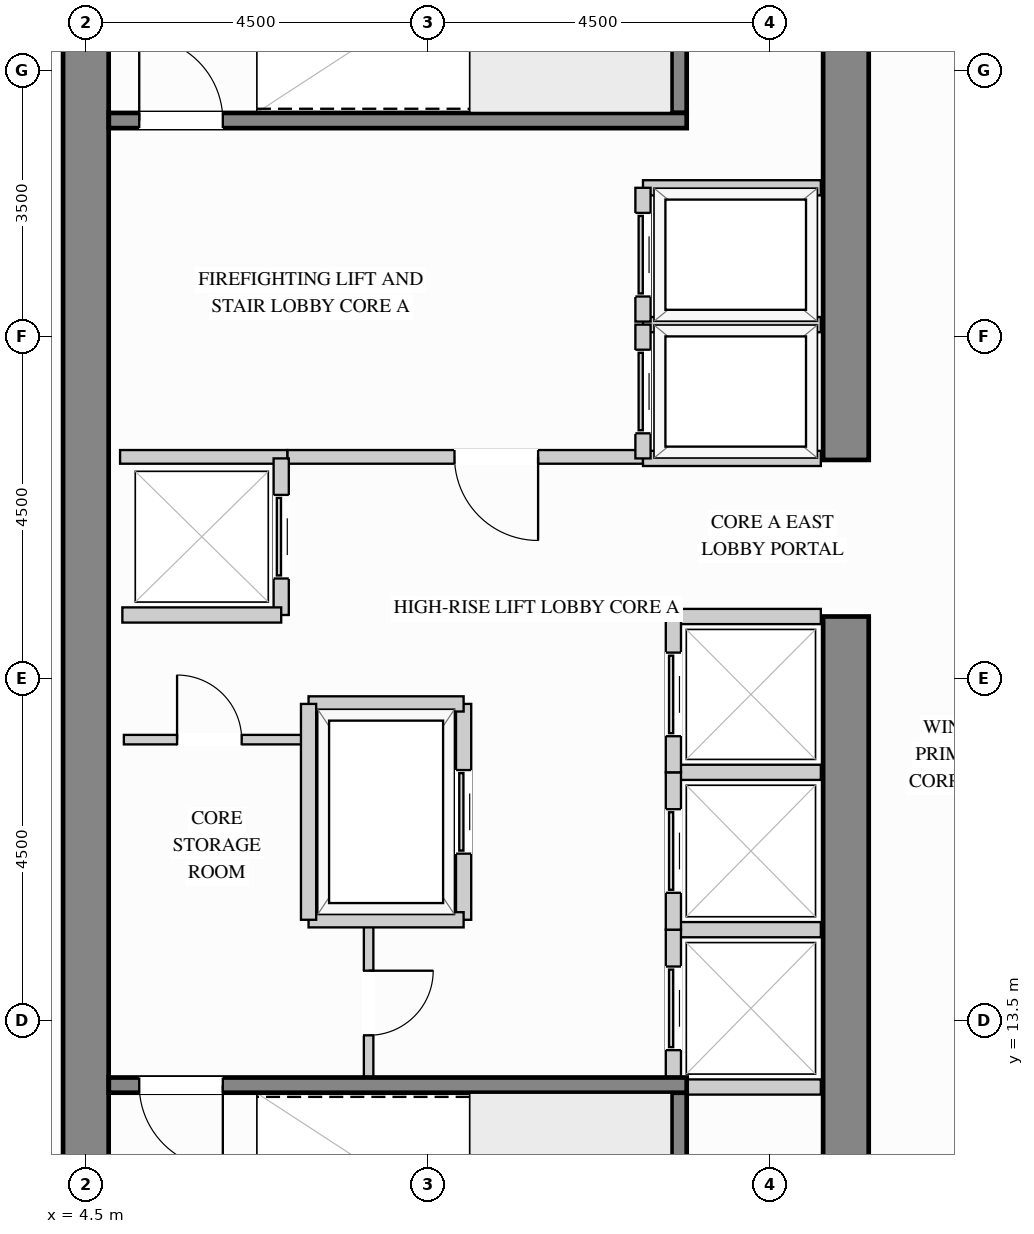
"""IFC4 building model, lengths in metres.
Left out: names, types, materials, properties, quantities, classifications, styles, units other than length and angle.
Written with IfcOpenShell. Run it as: python <this file> out.ifc"""

import sys

from ifc_helpers import new_model, si_unit, direction, frame, frame_2d, origin, place, context, subcontext, project, spatial, rectangle, extrude, source, transform, mapped, element, fill, save


model = new_model("IFC4")
c1 = context("Model", 3, precision=1e-05, world=origin(), true_north=direction((0.0, 1.0)))
c2 = subcontext(c1, "Body", "Model", "MODEL_VIEW")
j1 = project(units=[si_unit("LENGTHUNIT", "METRE"), si_unit("PLANEANGLEUNIT", "RADIAN")], contexts=[c1])
p1 = place(None, origin())
s1 = spatial("IfcSite", under=j1, at=p1, CompositionType="ELEMENT")
p2 = place(p1, origin())
s2 = spatial("IfcBuilding", under=s1, at=p2, CompositionType="ELEMENT")
p3 = place(p2, frame((0.0, 0.0, 193.5)))
s3 = spatial("IfcBuildingStorey", under=s2, at=p3, CompositionType="ELEMENT", Elevation=193.5)
m1 = source(origin(), c2, "Body", "SweptSolid", [
    extrude(rectangle(XDim=10.02, YDim=0.6, at=frame_2d((5.01, 0.0))), origin(), (0.0, 0.0, 1.0), 3.4),
])
p4 = place(p3, frame((14.5, 8.8, 0.0), z_axis=(0.0, 0.0, 1.0), x_axis=(0.0, 1.0, 0.0)))
e1 = element("IfcWall", 1, at=p4, inside=s3, PredefinedType="SHEAR", context=c2, shape_type="MappedRepresentation", body=[
    mapped(m1, transform((0.0, 0.0, 0.0), x_axis=(1.0, 0.0, 0.0), y_axis=(0.0, 1.0, 0.0), z_axis=(0.0, 0.0, 1.0))),
])
m2 = source(origin(), c2, "Body", "SweptSolid", [
    extrude(rectangle(XDim=8.32, YDim=0.6, at=frame_2d((4.16, 0.0))), origin(), (0.0, 0.0, 1.0), 3.4),
])
p5 = place(p3, frame((14.5, 20.88, 0.0), z_axis=(0.0, 0.0, 1.0), x_axis=(0.0, 1.0, 0.0)))
e2 = element("IfcWall", 2, at=p5, inside=s3, PredefinedType="SHEAR", context=c2, shape_type="MappedRepresentation", body=[
    mapped(m2, transform((0.0, 0.0, 0.0), x_axis=(1.0, 0.0, 0.0), y_axis=(0.0, 1.0, 0.0), z_axis=(0.0, 0.0, 1.0))),
])
m3 = source(origin(), c2, "Body", "SweptSolid", [
    extrude(rectangle(XDim=20.4, YDim=0.6, at=frame_2d((10.2, 0.0))), origin(), (0.0, 0.0, 1.0), 3.4),
])
p6 = place(p3, frame((4.5, 8.8, 0.0), z_axis=(0.0, 0.0, 1.0), x_axis=(0.0, 1.0, 0.0)))
e3 = element("IfcWall", 3, at=p6, inside=s3, PredefinedType="SHEAR", context=c2, shape_type="MappedRepresentation", body=[
    mapped(m3, transform((0.0, 0.0, 0.0), x_axis=(1.0, 0.0, 0.0), y_axis=(0.0, 1.0, 0.0), z_axis=(0.0, 0.0, 1.0))),
])
p7 = place(p3, frame((7.15, 20.92, 0.0), z_axis=(0.0, 0.0, 1.0), x_axis=(1.0, 0.0, 0.0)))
e4 = element("IfcWall", 4, at=p7, inside=s3, PredefinedType="PARTITIONING", context=c2, shape_type="SweptSolid", body=[
    extrude(rectangle(XDim=4.68, YDim=0.18, at=frame_2d((2.34, 0.0))), origin(), (0.0, 0.0, 1.0), 3.385),
])
p8 = place(p7, frame((2.2, 0.0, 0.0)))
e5 = element("IfcOpeningElement", 5, at=p8, cuts=e4, PredefinedType="OPENING", context=c2, shape_type="SweptSolid", body=[
    extrude(rectangle(XDim=1.1, YDim=2.15, at=frame_2d((0.55, 1.075))), frame((0.0, 0.1, 0.0), z_axis=(0.0, -1.0, 0.0), x_axis=(1.0, 0.0, 0.0)), (0.0, 0.0, 1.0), 0.2),
])
m4 = source(origin(), c2, "Body", "SweptSolid", [
    extrude(rectangle(XDim=2.2, YDim=0.18, at=frame_2d((1.1, 0.0))), origin(), (0.0, 0.0, 1.0), 3.385),
])
p9 = place(p3, frame((4.95, 20.92, 0.0), z_axis=(0.0, 0.0, 1.0), x_axis=(1.0, 0.0, 0.0)))
e6 = element("IfcWall", 6, at=p9, inside=s3, PredefinedType="PARTITIONING", context=c2, shape_type="MappedRepresentation", body=[
    mapped(m4, transform((0.0, 0.0, 0.0), x_axis=(1.0, 0.0, 0.0), y_axis=(0.0, 1.0, 0.0), z_axis=(0.0, 0.0, 1.0))),
])
p10 = place(p3, frame((8.22, 12.75, 0.0), z_axis=(0.0, 0.0, 1.0), x_axis=(0.0, 1.0, 0.0)))
e7 = element("IfcWall", 7, at=p10, inside=s3, PredefinedType="PARTITIONING", context=c2, shape_type="SweptSolid", body=[
    extrude(rectangle(XDim=2.07, YDim=0.125, at=frame_2d((1.035, 0.0))), origin(), (0.0, 0.0, 1.0), 3.385),
])
p11 = place(p10, frame((0.56, 0.0, 0.0)))
e8 = element("IfcOpeningElement", 8, at=p11, cuts=e7, PredefinedType="OPENING", context=c2, shape_type="SweptSolid", body=[
    extrude(rectangle(XDim=0.85, YDim=2.1, at=frame_2d((0.425, 1.05))), frame((0.0, 0.073, 0.0), z_axis=(0.0, -1.0, 0.0), x_axis=(1.0, 0.0, 0.0)), (0.0, 0.0, 1.0), 0.145),
])
p12 = place(p3, frame((5.0, 17.2, 0.0), z_axis=(0.0, 0.0, 1.0), x_axis=(1.0, 0.0, 0.0)))
e9 = element("IfcWall", 9, at=p12, inside=s3, PredefinedType="PARTITIONING", context=c2, shape_type="SweptSolid", body=[
    extrude(rectangle(XDim=2.4, YDim=0.125, at=frame_2d((1.2, 0.0))), origin(), (0.0, 0.0, 1.0), 3.385),
])
p13 = place(p12, frame((0.7, 0.0, 0.0)))
e10 = element("IfcOpeningElement", 10, at=p13, cuts=e9, PredefinedType="OPENING", context=c2, shape_type="SweptSolid", body=[
    extrude(rectangle(XDim=0.85, YDim=2.1, at=frame_2d((0.425, 1.05))), frame((0.0, 0.073, 0.0), z_axis=(0.0, -1.0, 0.0), x_axis=(1.0, 0.0, 0.0)), (0.0, 0.0, 1.0), 0.145),
])
m5 = source(origin(), c2, "Body", "SweptSolid", [
    extrude(rectangle(XDim=2.34, YDim=0.2, at=frame_2d((1.17, 0.0))), origin(), (0.0, 0.0, 1.0), 3.385),
])
for number, where, z_axis, x_axis in (
    (11, (11.83, 22.66, 0.0), (0.0, 0.0, 1.0), (1.0, 0.0, 0.0)),
    (12, (11.83, 20.9, 0.0), (0.0, 0.0, 1.0), (1.0, 0.0, 0.0)),
):
    element("IfcWall", number, at=place(p3, frame(where, z_axis=z_axis, x_axis=x_axis)), inside=s3, PredefinedType="PARTITIONING", context=c2, shape_type="MappedRepresentation", body=[
        mapped(m5, transform((0.0, 0.0, 0.0), x_axis=(1.0, 0.0, 0.0), y_axis=(0.0, 1.0, 0.0), z_axis=(0.0, 0.0, 1.0))),
    ])
p14 = place(p3, frame((11.83, 20.9, 0.0), z_axis=(0.0, 0.0, 1.0), x_axis=(0.0, 1.0, 0.0)))
e13 = element("IfcWall", 13, at=p14, inside=s3, PredefinedType="PARTITIONING", context=c2, shape_type="SweptSolid", body=[
    extrude(rectangle(XDim=1.76, YDim=0.2, at=frame_2d((0.88, 0.0))), origin(), (0.0, 0.0, 1.0), 3.385),
])
p15 = place(p14, frame((0.33, 0.0, 0.0)))
e14 = element("IfcOpeningElement", 14, at=p15, cuts=e13, PredefinedType="OPENING", context=c2, shape_type="SweptSolid", body=[
    extrude(rectangle(XDim=1.1, YDim=2.2, at=frame_2d((0.55, 1.1))), frame((0.0, 0.11, 0.0), z_axis=(0.0, -1.0, 0.0), x_axis=(1.0, 0.0, 0.0)), (0.0, 0.0, 1.0), 0.22),
])
p16 = place(p3, frame((11.83, 24.46, 0.0), z_axis=(0.0, 0.0, 1.0), x_axis=(1.0, 0.0, 0.0)))
e15 = element("IfcWall", 15, at=p16, inside=s3, PredefinedType="PARTITIONING", context=c2, shape_type="MappedRepresentation", body=[
    mapped(m5, transform((0.0, 0.0, 0.0), x_axis=(1.0, 0.0, 0.0), y_axis=(0.0, 1.0, 0.0), z_axis=(0.0, 0.0, 1.0))),
])
p17 = place(p3, frame((11.83, 22.7, 0.0), z_axis=(0.0, 0.0, 1.0), x_axis=(0.0, 1.0, 0.0)))
e16 = element("IfcWall", 16, at=p17, inside=s3, PredefinedType="PARTITIONING", context=c2, shape_type="SweptSolid", body=[
    extrude(rectangle(XDim=1.76, YDim=0.2, at=frame_2d((0.88, 0.0))), origin(), (0.0, 0.0, 1.0), 3.385),
])
p18 = place(p17, frame((0.33, 0.0, 0.0)))
e17 = element("IfcOpeningElement", 17, at=p18, cuts=e16, PredefinedType="OPENING", context=c2, shape_type="SweptSolid", body=[
    extrude(rectangle(XDim=1.1, YDim=2.2, at=frame_2d((0.55, 1.1))), frame((0.0, 0.11, 0.0), z_axis=(0.0, -1.0, 0.0), x_axis=(1.0, 0.0, 0.0)), (0.0, 0.0, 1.0), 0.22),
])
m6 = source(origin(), c2, "Body", "SweptSolid", [
    extrude(rectangle(XDim=1.94, YDim=0.2, at=frame_2d((0.97, 0.0))), origin(), (0.0, 0.0, 1.0), 3.385),
])
for number, where, z_axis, x_axis in (
    (18, (12.23, 14.7, 0.0), (0.0, 0.0, 1.0), (1.0, 0.0, 0.0)),
    (19, (12.23, 12.63, 0.0), (0.0, 0.0, 1.0), (1.0, 0.0, 0.0)),
):
    element("IfcWall", number, at=place(p3, frame(where, z_axis=z_axis, x_axis=x_axis)), inside=s3, PredefinedType="PARTITIONING", context=c2, shape_type="MappedRepresentation", body=[
        mapped(m6, transform((0.0, 0.0, 0.0), x_axis=(1.0, 0.0, 0.0), y_axis=(0.0, 1.0, 0.0), z_axis=(0.0, 0.0, 1.0))),
    ])
p19 = place(p3, frame((12.23, 12.63, 0.0), z_axis=(0.0, 0.0, 1.0), x_axis=(0.0, 1.0, 0.0)))
e20 = element("IfcWall", 20, at=p19, inside=s3, PredefinedType="PARTITIONING", context=c2, shape_type="SweptSolid", body=[
    extrude(rectangle(XDim=2.07, YDim=0.2, at=frame_2d((1.035, 0.0))), origin(), (0.0, 0.0, 1.0), 3.385),
])
p20 = place(p19, frame((0.485, 0.0, 0.0)))
e21 = element("IfcOpeningElement", 21, at=p20, cuts=e20, PredefinedType="OPENING", context=c2, shape_type="SweptSolid", body=[
    extrude(rectangle(XDim=1.1, YDim=2.2, at=frame_2d((0.55, 1.1))), frame((0.0, 0.11, 0.0), z_axis=(0.0, -1.0, 0.0), x_axis=(1.0, 0.0, 0.0)), (0.0, 0.0, 1.0), 0.22),
])
p21 = place(p3, frame((12.23, 16.77, 0.0), z_axis=(0.0, 0.0, 1.0), x_axis=(1.0, 0.0, 0.0)))
e22 = element("IfcWall", 22, at=p21, inside=s3, PredefinedType="PARTITIONING", context=c2, shape_type="MappedRepresentation", body=[
    mapped(m6, transform((0.0, 0.0, 0.0), x_axis=(1.0, 0.0, 0.0), y_axis=(0.0, 1.0, 0.0), z_axis=(0.0, 0.0, 1.0))),
])
p22 = place(p3, frame((12.23, 14.7, 0.0), z_axis=(0.0, 0.0, 1.0), x_axis=(0.0, 1.0, 0.0)))
e23 = element("IfcWall", 23, at=p22, inside=s3, PredefinedType="PARTITIONING", context=c2, shape_type="SweptSolid", body=[
    extrude(rectangle(XDim=2.07, YDim=0.2, at=frame_2d((1.035, 0.0))), origin(), (0.0, 0.0, 1.0), 3.385),
])
p23 = place(p22, frame((0.485, 0.0, 0.0)))
e24 = element("IfcOpeningElement", 24, at=p23, cuts=e23, PredefinedType="OPENING", context=c2, shape_type="SweptSolid", body=[
    extrude(rectangle(XDim=1.1, YDim=2.2, at=frame_2d((0.55, 1.1))), frame((0.0, 0.11, 0.0), z_axis=(0.0, -1.0, 0.0), x_axis=(1.0, 0.0, 0.0)), (0.0, 0.0, 1.0), 0.22),
])
p24 = place(p3, frame((12.23, 18.82, 0.0), z_axis=(0.0, 0.0, 1.0), x_axis=(1.0, 0.0, 0.0)))
e25 = element("IfcWall", 25, at=p24, inside=s3, PredefinedType="PARTITIONING", context=c2, shape_type="MappedRepresentation", body=[
    mapped(m6, transform((0.0, 0.0, 0.0), x_axis=(1.0, 0.0, 0.0), y_axis=(0.0, 1.0, 0.0), z_axis=(0.0, 0.0, 1.0))),
])
p25 = place(p3, frame((12.23, 16.77, 0.0), z_axis=(0.0, 0.0, 1.0), x_axis=(0.0, 1.0, 0.0)))
e26 = element("IfcWall", 26, at=p25, inside=s3, PredefinedType="PARTITIONING", context=c2, shape_type="SweptSolid", body=[
    extrude(rectangle(XDim=2.05, YDim=0.2, at=frame_2d((1.025, 0.0))), origin(), (0.0, 0.0, 1.0), 3.385),
])
p26 = place(p25, frame((0.475, 0.0, 0.0)))
e27 = element("IfcOpeningElement", 27, at=p26, cuts=e26, PredefinedType="OPENING", context=c2, shape_type="SweptSolid", body=[
    extrude(rectangle(XDim=1.1, YDim=2.2, at=frame_2d((0.55, 1.1))), frame((0.0, 0.11, 0.0), z_axis=(0.0, -1.0, 0.0), x_axis=(1.0, 0.0, 0.0)), (0.0, 0.0, 1.0), 0.22),
])
p27 = place(p3, frame((7.07, 18.84, 0.0), z_axis=(0.0, 0.0, 1.0), x_axis=(0.0, 1.0, 0.0)))
e28 = element("IfcWall", 28, at=p27, inside=s3, PredefinedType="PARTITIONING", context=c2, shape_type="SweptSolid", body=[
    extrude(rectangle(XDim=2.06, YDim=0.2, at=frame_2d((1.03, 0.0))), origin(), (0.0, 0.0, 1.0), 3.385),
])
p28 = place(p27, frame((0.48, 0.0, 0.0)))
e29 = element("IfcOpeningElement", 29, at=p28, cuts=e28, PredefinedType="OPENING", context=c2, shape_type="SweptSolid", body=[
    extrude(rectangle(XDim=1.1, YDim=2.2, at=frame_2d((0.55, 1.1))), frame((0.0, 0.11, 0.0), z_axis=(0.0, -1.0, 0.0), x_axis=(1.0, 0.0, 0.0)), (0.0, 0.0, 1.0), 0.22),
])
m7 = source(origin(), c2, "Body", "SweptSolid", [
    extrude(rectangle(XDim=2.09, YDim=0.2, at=frame_2d((1.045, 0.0))), origin(), (0.0, 0.0, 1.0), 3.385),
])
p29 = place(p3, frame((4.98, 18.84, 0.0), z_axis=(0.0, 0.0, 1.0), x_axis=(1.0, 0.0, 0.0)))
e30 = element("IfcWall", 30, at=p29, inside=s3, PredefinedType="PARTITIONING", context=c2, shape_type="MappedRepresentation", body=[
    mapped(m7, transform((0.0, 0.0, 0.0), x_axis=(1.0, 0.0, 0.0), y_axis=(0.0, 1.0, 0.0), z_axis=(0.0, 0.0, 1.0))),
])
p30 = place(p3, frame((9.47, 14.83, 0.0), z_axis=(0.0, 0.0, 1.0), x_axis=(0.0, 1.0, 0.0)))
e31 = element("IfcWall", 31, at=p30, inside=s3, PredefinedType="PARTITIONING", context=c2, shape_type="SweptSolid", body=[
    extrude(rectangle(XDim=2.84, YDim=0.2, at=frame_2d((1.42, 0.0))), origin(), (0.0, 0.0, 1.0), 3.385),
])
p31 = place(p30, frame((0.87, 0.0, 0.0)))
e32 = element("IfcOpeningElement", 32, at=p31, cuts=e31, PredefinedType="OPENING", context=c2, shape_type="SweptSolid", body=[
    extrude(rectangle(XDim=1.1, YDim=2.2, at=frame_2d((0.55, 1.1))), frame((0.0, 0.11, 0.0), z_axis=(0.0, -1.0, 0.0), x_axis=(1.0, 0.0, 0.0)), (0.0, 0.0, 1.0), 0.22),
])
m8 = source(origin(), c2, "Body", "SweptSolid", [
    extrude(rectangle(XDim=2.04, YDim=0.2, at=frame_2d((1.02, 0.0))), origin(), (0.0, 0.0, 1.0), 3.385),
])
for number, where, z_axis, x_axis in (
    (33, (7.43, 17.67, 0.0), (0.0, 0.0, 1.0), (1.0, 0.0, 0.0)),
    (34, (7.43, 14.83, 0.0), (0.0, 0.0, 1.0), (1.0, 0.0, 0.0)),
):
    element("IfcWall", number, at=place(p3, frame(where, z_axis=z_axis, x_axis=x_axis)), inside=s3, PredefinedType="PARTITIONING", context=c2, shape_type="MappedRepresentation", body=[
        mapped(m8, transform((0.0, 0.0, 0.0), x_axis=(1.0, 0.0, 0.0), y_axis=(0.0, 1.0, 0.0), z_axis=(0.0, 0.0, 1.0))),
    ])
m9 = source(origin(), c2, "Body", "SweptSolid", [
    extrude(rectangle(XDim=2.84, YDim=0.2, at=frame_2d((1.42, 0.0))), origin(), (0.0, 0.0, 1.0), 3.385),
])
p32 = place(p3, frame((7.43, 14.83, 0.0), z_axis=(0.0, 0.0, 1.0), x_axis=(0.0, 1.0, 0.0)))
e35 = element("IfcWall", 35, at=p32, inside=s3, PredefinedType="PARTITIONING", context=c2, shape_type="MappedRepresentation", body=[
    mapped(m9, transform((0.0, 0.0, 0.0), x_axis=(1.0, 0.0, 0.0), y_axis=(0.0, 1.0, 0.0), z_axis=(0.0, 0.0, 1.0))),
])
m10 = source(origin(), c2, "Body", "SweptSolid", [
    extrude(rectangle(XDim=3.753, YDim=0.2, at=frame_2d((1.876, 0.0))), origin(), (0.0, 0.0, 1.0), 3.4),
])
p33 = place(p3, frame((12.305, 8.802, 0.0), z_axis=(0.0, 0.0, 1.0), x_axis=(0.0, 1.0, 0.0)))
e36 = element("IfcWall", 36, at=p33, inside=s3, PredefinedType="SHEAR", context=c2, shape_type="MappedRepresentation", body=[
    mapped(m10, transform((0.0, 0.0, 0.0), x_axis=(1.0, 0.0, 0.0), y_axis=(0.0, 1.0, 0.0), z_axis=(0.0, 0.0, 1.0))),
])
p34 = place(p3, frame((4.802, 12.655, 0.0), z_axis=(0.0, 0.0, 1.0), x_axis=(1.0, 0.0, 0.0)))
e37 = element("IfcWall", 37, at=p34, inside=s3, PredefinedType="SHEAR", context=c2, shape_type="SweptSolid", body=[
    extrude(rectangle(XDim=7.603, YDim=0.2, at=frame_2d((3.802, 0.0))), origin(), (0.0, 0.0, 1.0), 3.4),
])
p35 = place(p34, frame((0.4, 0.0, 0.0)))
e38 = element("IfcOpeningElement", 38, at=p35, cuts=e37, PredefinedType="OPENING", context=c2, shape_type="SweptSolid", body=[
    extrude(rectangle(XDim=1.1, YDim=2.15, at=frame_2d((0.55, 1.075))), frame((0.0, 0.11, 0.0), z_axis=(0.0, -1.0, 0.0), x_axis=(1.0, 0.0, 0.0)), (0.0, 0.0, 1.0), 0.22),
])
p36 = place(p3, frame((12.305, 25.445, 0.0), z_axis=(0.0, 0.0, 1.0), x_axis=(0.0, 1.0, 0.0)))
e39 = element("IfcWall", 39, at=p36, inside=s3, PredefinedType="SHEAR", context=c2, shape_type="MappedRepresentation", body=[
    mapped(m10, transform((0.0, 0.0, 0.0), x_axis=(1.0, 0.0, 0.0), y_axis=(0.0, 1.0, 0.0), z_axis=(0.0, 0.0, 1.0))),
])
p37 = place(p3, frame((4.802, 25.345, 0.0), z_axis=(0.0, 0.0, 1.0), x_axis=(1.0, 0.0, 0.0)))
e40 = element("IfcWall", 40, at=p37, inside=s3, PredefinedType="SHEAR", context=c2, shape_type="SweptSolid", body=[
    extrude(rectangle(XDim=7.603, YDim=0.2, at=frame_2d((3.802, 0.0))), origin(), (0.0, 0.0, 1.0), 3.4),
])
p38 = place(p37, frame((0.4, 0.0, 0.0)))
e41 = element("IfcOpeningElement", 41, at=p38, cuts=e40, PredefinedType="OPENING", context=c2, shape_type="SweptSolid", body=[
    extrude(rectangle(XDim=1.1, YDim=2.15, at=frame_2d((0.55, 1.075))), frame((0.0, 0.11, 0.0), z_axis=(0.0, -1.0, 0.0), x_axis=(1.0, 0.0, 0.0)), (0.0, 0.0, 1.0), 0.22),
])
m11 = source(origin(), c2, "Body", "SweptSolid", [
    extrude(rectangle(XDim=1.1, YDim=2.15, at=frame_2d((0.55, 1.075))), frame((0.0, 0.025, 0.0), z_axis=(0.0, -1.0, 0.0), x_axis=(1.0, 0.0, 0.0)), (0.0, 0.0, 1.0), 0.05),
])
p39 = place(p8, origin())
e42 = element("IfcDoor", 42, at=p39, inside=s3, OperationType="SINGLE_SWING_RIGHT", PredefinedType="DOOR", context=c2, shape_type="MappedRepresentation", body=[
    mapped(m11, transform((0.0, 0.0, 0.0), x_axis=(1.0, 0.0, 0.0), y_axis=(0.0, 1.0, 0.0), z_axis=(0.0, 0.0, 1.0))),
])
fill(e5, e42)
m12 = source(origin(), c2, "Body", "SweptSolid", [
    extrude(rectangle(XDim=1.1, YDim=2.2, at=frame_2d((0.55, 1.1))), frame((0.0, 0.025, 0.0), z_axis=(0.0, -1.0, 0.0), x_axis=(1.0, 0.0, 0.0)), (0.0, 0.0, 1.0), 0.05),
])
p40 = place(p15, origin())
e43 = element("IfcDoor", 43, at=p40, inside=s3, OperationType="SLIDING_TO_LEFT", PredefinedType="DOOR", context=c2, shape_type="MappedRepresentation", body=[
    mapped(m12, transform((0.0, 0.0, 0.0), x_axis=(1.0, 0.0, 0.0), y_axis=(0.0, 1.0, 0.0), z_axis=(0.0, 0.0, 1.0))),
])
fill(e14, e43)
p41 = place(p18, origin())
e44 = element("IfcDoor", 44, at=p41, inside=s3, OperationType="SLIDING_TO_LEFT", PredefinedType="DOOR", context=c2, shape_type="MappedRepresentation", body=[
    mapped(m12, transform((0.0, 0.0, 0.0), x_axis=(1.0, 0.0, 0.0), y_axis=(0.0, 1.0, 0.0), z_axis=(0.0, 0.0, 1.0))),
])
fill(e17, e44)
p42 = place(p20, origin())
e45 = element("IfcDoor", 45, at=p42, inside=s3, OperationType="SLIDING_TO_LEFT", PredefinedType="DOOR", context=c2, shape_type="MappedRepresentation", body=[
    mapped(m12, transform((0.0, 0.0, 0.0), x_axis=(1.0, 0.0, 0.0), y_axis=(0.0, 1.0, 0.0), z_axis=(0.0, 0.0, 1.0))),
])
fill(e21, e45)
p43 = place(p23, origin())
e46 = element("IfcDoor", 46, at=p43, inside=s3, OperationType="SLIDING_TO_LEFT", PredefinedType="DOOR", context=c2, shape_type="MappedRepresentation", body=[
    mapped(m12, transform((0.0, 0.0, 0.0), x_axis=(1.0, 0.0, 0.0), y_axis=(0.0, 1.0, 0.0), z_axis=(0.0, 0.0, 1.0))),
])
fill(e24, e46)
p44 = place(p26, origin())
e47 = element("IfcDoor", 47, at=p44, inside=s3, OperationType="SLIDING_TO_LEFT", PredefinedType="DOOR", context=c2, shape_type="MappedRepresentation", body=[
    mapped(m12, transform((0.0, 0.0, 0.0), x_axis=(1.0, 0.0, 0.0), y_axis=(0.0, 1.0, 0.0), z_axis=(0.0, 0.0, 1.0))),
])
fill(e27, e47)
p45 = place(p28, origin())
e48 = element("IfcDoor", 48, at=p45, inside=s3, OperationType="SLIDING_TO_LEFT", PredefinedType="DOOR", context=c2, shape_type="MappedRepresentation", body=[
    mapped(m12, transform((0.0, 0.0, 0.0), x_axis=(1.0, 0.0, 0.0), y_axis=(0.0, 1.0, 0.0), z_axis=(0.0, 0.0, 1.0))),
])
fill(e29, e48)
p46 = place(p31, origin())
e49 = element("IfcDoor", 49, at=p46, inside=s3, OperationType="SLIDING_TO_LEFT", PredefinedType="DOOR", context=c2, shape_type="MappedRepresentation", body=[
    mapped(m12, transform((0.0, 0.0, 0.0), x_axis=(1.0, 0.0, 0.0), y_axis=(0.0, 1.0, 0.0), z_axis=(0.0, 0.0, 1.0))),
])
fill(e32, e49)
m13 = source(origin(), c2, "Body", "SweptSolid", [
    extrude(rectangle(XDim=0.85, YDim=2.1, at=frame_2d((0.425, 1.05))), frame((0.0, 0.025, 0.0), z_axis=(0.0, -1.0, 0.0), x_axis=(1.0, 0.0, 0.0)), (0.0, 0.0, 1.0), 0.05),
])
p47 = place(p13, origin())
e50 = element("IfcDoor", 50, at=p47, inside=s3, OperationType="SINGLE_SWING_LEFT", PredefinedType="DOOR", context=c2, shape_type="MappedRepresentation", body=[
    mapped(m13, transform((0.0, 0.0, 0.0), x_axis=(1.0, 0.0, 0.0), y_axis=(0.0, 1.0, 0.0), z_axis=(0.0, 0.0, 1.0))),
])
fill(e10, e50)
p48 = place(p11, origin())
e51 = element("IfcDoor", 51, at=p48, inside=s3, OperationType="SINGLE_SWING_RIGHT", PredefinedType="DOOR", context=c2, shape_type="MappedRepresentation", body=[
    mapped(m13, transform((0.0, 0.0, 0.0), x_axis=(1.0, 0.0, 0.0), y_axis=(0.0, 1.0, 0.0), z_axis=(0.0, 0.0, 1.0))),
])
fill(e8, e51)
m14 = source(origin(), c2, "Body", "SweptSolid", [
    extrude(rectangle(XDim=1.1, YDim=2.15, at=frame_2d((0.55, 1.075))), frame((0.0, 0.025, 0.0), z_axis=(0.0, -1.0, 0.0), x_axis=(1.0, 0.0, 0.0)), (0.0, 0.0, 1.0), 0.05),
])
p49 = place(p35, origin())
e52 = element("IfcDoor", 52, at=p49, inside=s3, OperationType="SINGLE_SWING_RIGHT", PredefinedType="DOOR", context=c2, shape_type="MappedRepresentation", body=[
    mapped(m14, transform((0.0, 0.0, 0.0), x_axis=(1.0, 0.0, 0.0), y_axis=(0.0, 1.0, 0.0), z_axis=(0.0, 0.0, 1.0))),
])
fill(e38, e52)
p50 = place(p38, origin())
e53 = element("IfcDoor", 53, at=p50, inside=s3, OperationType="SINGLE_SWING_LEFT", PredefinedType="DOOR", context=c2, shape_type="MappedRepresentation", body=[
    mapped(m14, transform((0.0, 0.0, 0.0), x_axis=(1.0, 0.0, 0.0), y_axis=(0.0, 1.0, 0.0), z_axis=(0.0, 0.0, 1.0))),
])
fill(e41, e53)
save(model, sys.argv[1])
